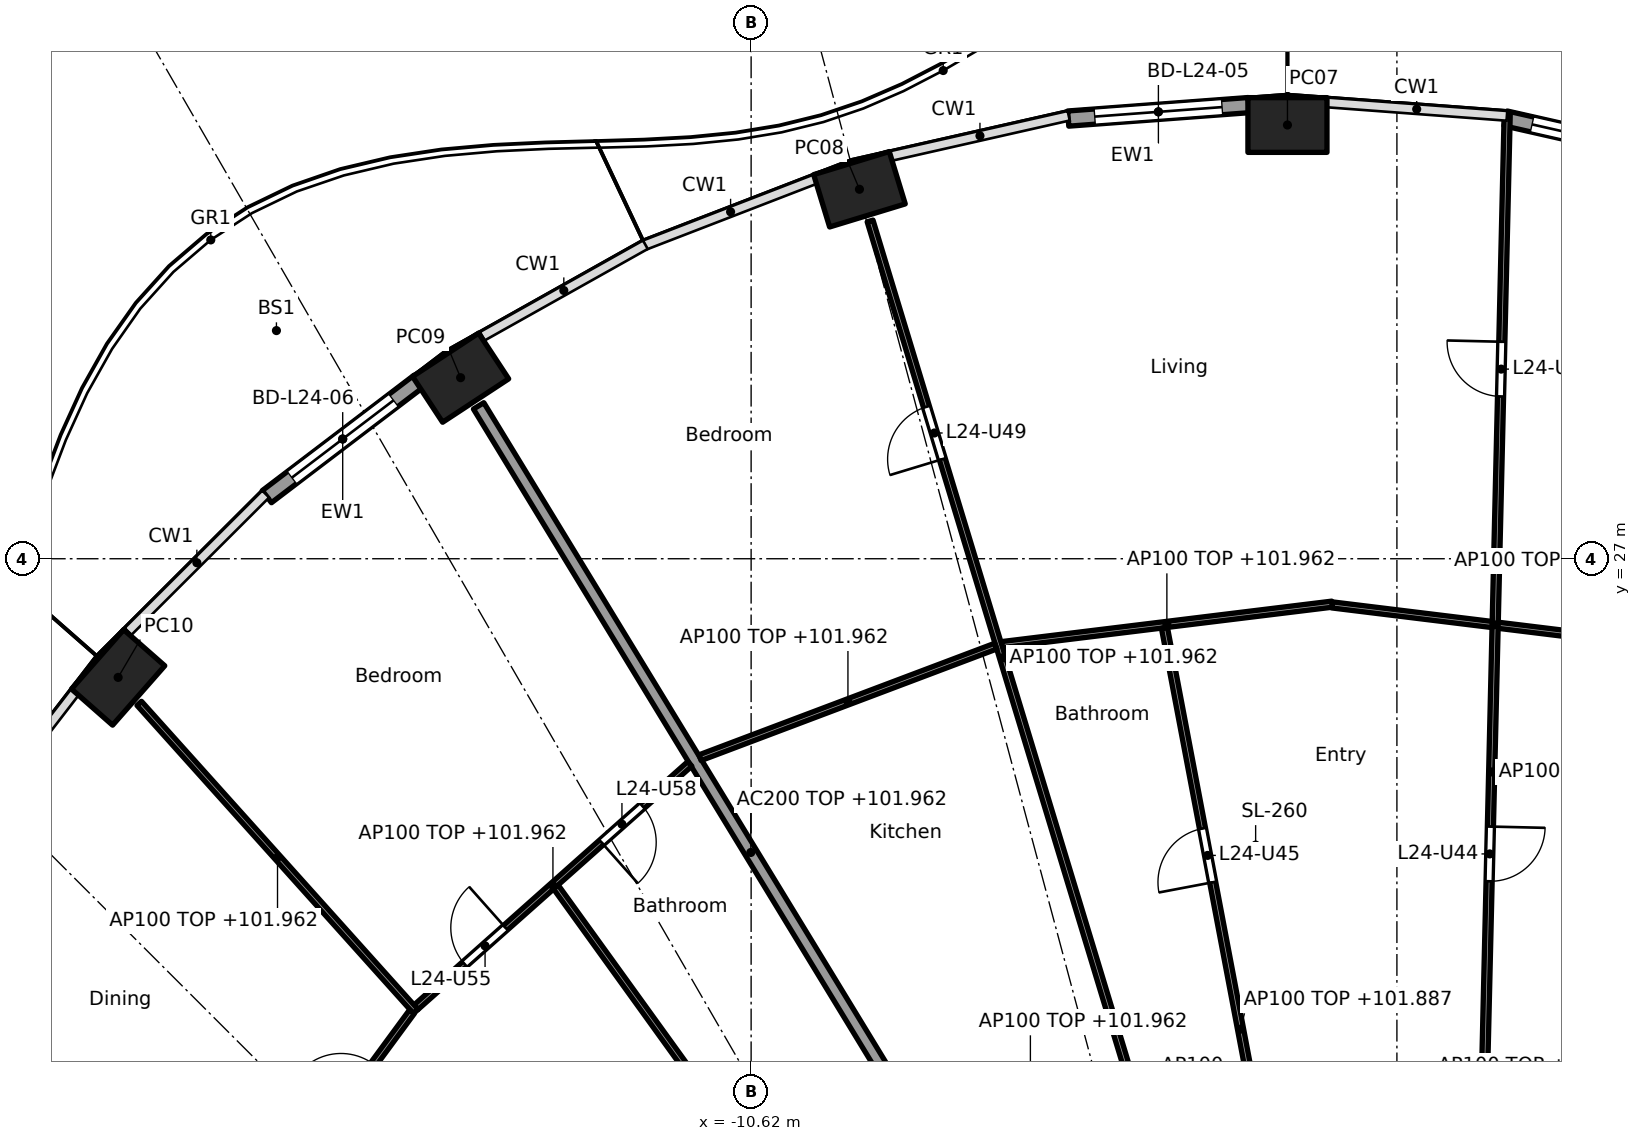
"""IFC4 building model, lengths in metres.
Left out: names, types, materials, properties, quantities, classifications, styles, units other than length and angle.
Written with IfcOpenShell. Run it as: python <this file> out.ifc"""

import sys

from ifc_helpers import new_model, si_unit, direction, frame, frame_2d, origin, origin_2d, place, context, subcontext, project, spatial, rectangle, hollow_rectangle, extrude, element, fill, save


model = new_model("IFC4")
c1 = context("Model", 3, precision=1e-05, world=origin(), true_north=direction((0.0, 1.0)))
c2 = subcontext(c1, "Body", "Model", "MODEL_VIEW")
j1 = project(units=[si_unit("LENGTHUNIT", "METRE"), si_unit("PLANEANGLEUNIT", "RADIAN")], contexts=[c1])
p1 = place(None, origin())
s1 = spatial("IfcSite", under=j1, at=p1, CompositionType="ELEMENT")
p2 = place(p1, origin())
s2 = spatial("IfcBuilding", under=s1, at=p2, CompositionType="ELEMENT")
p3 = place(p2, frame((0.0, 0.0, 99.2)))
s3 = spatial("IfcBuildingStorey", under=s2, at=p3, CompositionType="ELEMENT", Elevation=99.2)
for number, where, z_axis, x_axis in (
    (1, (-1.8, 34.133, 0.0), (0.0, 0.0, 1.0), (-1.0, 0.0, 0.0)),
    (2, (-8.839, 33.076, 0.0), (0.0, 0.0, 1.0), (-0.957, -0.292, 0.0)),
    (3, (-15.397, 29.978, 0.0), (0.0, 0.0, 1.0), (-0.836, -0.549, 0.0)),
    (4, (-21.03, 25.049, 0.0), (0.0, 0.0, 1.0), (-0.66, -0.751, 0.0)),
):
    element("IfcColumn", number, at=place(p3, frame(where, z_axis=z_axis, x_axis=x_axis)), inside=s3, PredefinedType="COLUMN", context=c2, shape_type="SweptSolid", body=[
        extrude(hollow_rectangle(XDim=1.3, YDim=0.9, WallThickness=0.045, at=origin_2d()), origin(), (0.0, 0.0, 1.0), 3.7),
    ])
p4 = place(p3, frame((1.787, 34.241, 0.0), z_axis=(0.0, 0.0, 1.0), x_axis=(0.975317607872, -0.220806620767, 0.0)))
e5 = element("IfcWall", 5, at=p4, inside=s3, PredefinedType="SOLIDWALL", context=c2, shape_type="SweptSolid", body=[
    extrude(rectangle(XDim=2.993, YDim=0.25, at=frame_2d((1.497, 0.0))), origin(), (0.0, 0.0, 1.0), 3.44),
])
p5 = place(p4, frame((0.447, 0.0, 0.0)))
e6 = element("IfcOpeningElement", 6, at=p5, cuts=e5, PredefinedType="OPENING", context=c2, shape_type="SweptSolid", body=[
    extrude(rectangle(XDim=2.1, YDim=2.4, at=frame_2d((1.05, 1.2))), frame((0.0, 0.135, 0.0), z_axis=(0.0, -1.0, 0.0), x_axis=(1.0, 0.0, 0.0)), (0.0, 0.0, 1.0), 0.27),
])
p6 = place(p3, frame((-5.406, 34.239, 0.0), z_axis=(0.0, 0.0, 1.0), x_axis=(0.997231808538, 0.074355363224, 0.0)))
e7 = element("IfcWall", 7, at=p6, inside=s3, PredefinedType="SOLIDWALL", context=c2, shape_type="SweptSolid", body=[
    extrude(rectangle(XDim=2.975, YDim=0.25, at=frame_2d((1.487, 0.0))), origin(), (0.0, 0.0, 1.0), 3.44),
])
p7 = place(p6, frame((0.438, 0.0, 0.0)))
e8 = element("IfcOpeningElement", 8, at=p7, cuts=e7, PredefinedType="OPENING", context=c2, shape_type="SweptSolid", body=[
    extrude(rectangle(XDim=2.1, YDim=2.4, at=frame_2d((1.05, 1.2))), frame((0.0, 0.135, 0.0), z_axis=(0.0, -1.0, 0.0), x_axis=(1.0, 0.0, 0.0)), (0.0, 0.0, 1.0), 0.27),
])
p8 = place(p3, frame((-18.584, 28.021, 0.0), z_axis=(0.0, 0.0, 1.0), x_axis=(0.796037575978, 0.605247203736, 0.0)))
e9 = element("IfcWall", 9, at=p8, inside=s3, PredefinedType="SOLIDWALL", context=c2, shape_type="SweptSolid", body=[
    extrude(rectangle(XDim=3.134, YDim=0.25, at=frame_2d((1.567, 0.0))), origin(), (0.0, 0.0, 1.0), 3.44),
])
p9 = place(p8, frame((0.517, 0.0, 0.0)))
e10 = element("IfcOpeningElement", 10, at=p9, cuts=e9, PredefinedType="OPENING", context=c2, shape_type="SweptSolid", body=[
    extrude(rectangle(XDim=2.1, YDim=2.4, at=frame_2d((1.05, 1.2))), frame((0.0, 0.135, 0.0), z_axis=(0.0, -1.0, 0.0), x_axis=(1.0, 0.0, 0.0)), (0.0, 0.0, 1.0), 0.27),
])
p10 = place(p3, frame((-6.149, 14.825, 0.0), z_axis=(0.0, 0.0, 1.0), x_axis=(-0.520412862249, 0.853914780763, 0.0)))
e11 = element("IfcWall", 11, at=p10, inside=s3, PredefinedType="PARTITIONING", context=c2, shape_type="SweptSolid", body=[
    extrude(rectangle(XDim=17.202, YDim=0.2, at=frame_2d((8.601, 0.0))), origin(), (0.0, 0.0, 1.0), 2.762),
])
p11 = place(p3, frame((4.267, 25.587, 0.0), z_axis=(0.0, 0.0, 1.0), x_axis=(-0.992576206119, 0.121624319302, 0.0)))
e12 = element("IfcWall", 12, at=p11, inside=s3, PredefinedType="PARTITIONING", context=c2, shape_type="SweptSolid", body=[
    extrude(rectangle(XDim=5.374, YDim=0.1, at=frame_2d((2.687, 0.0))), origin(), (0.0, 0.0, 1.0), 2.762),
])
p12 = place(p3, frame((1.303, 12.665, 0.0), z_axis=(0.0, 0.0, 1.0), x_axis=(0.023564110689, 0.999722327793, 0.0)))
e13 = element("IfcWall", 13, at=p12, inside=s3, PredefinedType="PARTITIONING", context=c2, shape_type="SweptSolid", body=[
    extrude(rectangle(XDim=21.664, YDim=0.1, at=frame_2d((10.832, 0.0))), origin(), (0.0, 0.0, 1.0), 2.687),
])
p13 = place(p12, frame((2.407, 0.0, 0.0)))
e14 = element("IfcOpeningElement", 14, at=p13, cuts=e13, PredefinedType="OPENING", context=c2, shape_type="SweptSolid", body=[
    extrude(rectangle(XDim=0.9, YDim=2.1, at=frame_2d((0.45, 1.05))), frame((0.0, 0.06, 0.0), z_axis=(0.0, -1.0, 0.0), x_axis=(1.0, 0.0, 0.0)), (0.0, 0.0, 1.0), 0.12),
])
p14 = place(p12, frame((9.034, 0.0, 0.0)))
e15 = element("IfcOpeningElement", 15, at=p14, cuts=e13, PredefinedType="OPENING", context=c2, shape_type="SweptSolid", body=[
    extrude(rectangle(XDim=0.9, YDim=2.1, at=frame_2d((0.45, 1.05))), frame((0.0, 0.06, 0.0), z_axis=(0.0, -1.0, 0.0), x_axis=(1.0, 0.0, 0.0)), (0.0, 0.0, 1.0), 0.12),
])
p15 = place(p12, frame((17.009, 0.0, 0.0)))
e16 = element("IfcOpeningElement", 16, at=p15, cuts=e13, PredefinedType="OPENING", context=c2, shape_type="SweptSolid", body=[
    extrude(rectangle(XDim=0.9, YDim=2.1, at=frame_2d((0.45, 1.05))), frame((0.0, 0.06, 0.0), z_axis=(0.0, -1.0, 0.0), x_axis=(1.0, 0.0, 0.0)), (0.0, 0.0, 1.0), 0.12),
])
p16 = place(p3, frame((-1.066, 26.253, 0.0), z_axis=(0.0, 0.0, 1.0), x_axis=(-0.992574853421, -0.121635358166, 0.0)))
e17 = element("IfcWall", 17, at=p16, inside=s3, PredefinedType="PARTITIONING", context=c2, shape_type="SweptSolid", body=[
    extrude(rectangle(XDim=5.473, YDim=0.1, at=frame_2d((2.737, 0.0))), origin(), (0.0, 0.0, 1.0), 2.762),
])
p17 = place(p3, frame((-1.32, 12.663, 0.0), z_axis=(0.0, 0.0, 1.0), x_axis=(-0.186308855238, 0.982491226658, 0.0)))
e18 = element("IfcWall", 18, at=p17, inside=s3, PredefinedType="PARTITIONING", context=c2, shape_type="SweptSolid", body=[
    extrude(rectangle(XDim=13.437, YDim=0.1, at=frame_2d((6.719, 0.0))), origin(), (0.0, 0.0, 1.0), 2.687),
])
p18 = place(p17, frame((2.458, 0.0, 0.0)))
e19 = element("IfcOpeningElement", 19, at=p18, cuts=e18, PredefinedType="OPENING", context=c2, shape_type="SweptSolid", body=[
    extrude(rectangle(XDim=0.9, YDim=2.1, at=frame_2d((0.45, 1.05))), frame((0.0, 0.06, 0.0), z_axis=(0.0, -1.0, 0.0), x_axis=(1.0, 0.0, 0.0)), (0.0, 0.0, 1.0), 0.12),
])
p19 = place(p17, frame((9.177, 0.0, 0.0)))
e20 = element("IfcOpeningElement", 20, at=p19, cuts=e18, PredefinedType="OPENING", context=c2, shape_type="SweptSolid", body=[
    extrude(rectangle(XDim=0.9, YDim=2.1, at=frame_2d((0.45, 1.05))), frame((0.0, 0.06, 0.0), z_axis=(0.0, -1.0, 0.0), x_axis=(1.0, 0.0, 0.0)), (0.0, 0.0, 1.0), 0.12),
])
p20 = place(p3, frame((-4.306, 18.185, 0.0), z_axis=(0.0, 0.0, 1.0), x_axis=(-0.290183838394, 0.956970919064, 0.0)))
e21 = element("IfcWall", 21, at=p20, inside=s3, PredefinedType="PARTITIONING", context=c2, shape_type="SweptSolid", body=[
    extrude(rectangle(XDim=15.015, YDim=0.1, at=frame_2d((7.508, 0.0))), origin(), (0.0, 0.0, 1.0), 2.762),
])
p21 = place(p20, frame((10.922, 0.0, 0.0)))
e22 = element("IfcOpeningElement", 22, at=p21, cuts=e21, PredefinedType="OPENING", context=c2, shape_type="SweptSolid", body=[
    extrude(rectangle(XDim=0.9, YDim=2.1, at=frame_2d((0.45, 1.05))), frame((0.0, 0.06, 0.0), z_axis=(0.0, -1.0, 0.0), x_axis=(1.0, 0.0, 0.0)), (0.0, 0.0, 1.0), 0.12),
])
p22 = place(p3, frame((-6.596, 25.563, 0.0), z_axis=(0.0, 0.0, 1.0), x_axis=(-0.935624838262, -0.352995980185, 0.0)))
e23 = element("IfcWall", 23, at=p22, inside=s3, PredefinedType="PARTITIONING", context=c2, shape_type="SweptSolid", body=[
    extrude(rectangle(XDim=5.199, YDim=0.1, at=frame_2d((2.6, 0.0))), origin(), (0.0, 0.0, 1.0), 2.762),
])
p23 = place(p3, frame((-11.628, 23.626, 0.0), z_axis=(0.0, 0.0, 1.0), x_axis=(-0.747429444005, -0.664341197153, 0.0)))
e24 = element("IfcWall", 24, at=p23, inside=s3, PredefinedType="PARTITIONING", context=c2, shape_type="SweptSolid", body=[
    extrude(rectangle(XDim=6.024, YDim=0.1, at=frame_2d((3.012, 0.0))), origin(), (0.0, 0.0, 1.0), 2.762),
])
p24 = place(p23, frame((4.055, 0.0, 0.0)))
e25 = element("IfcOpeningElement", 25, at=p24, cuts=e24, PredefinedType="OPENING", context=c2, shape_type="SweptSolid", body=[
    extrude(rectangle(XDim=0.9, YDim=2.1, at=frame_2d((0.45, 1.05))), frame((0.0, 0.06, 0.0), z_axis=(0.0, -1.0, 0.0), x_axis=(1.0, 0.0, 0.0)), (0.0, 0.0, 1.0), 0.12),
])
p25 = place(p23, frame((1.043, 0.0, 0.0)))
e26 = element("IfcOpeningElement", 26, at=p25, cuts=e24, PredefinedType="OPENING", context=c2, shape_type="SweptSolid", body=[
    extrude(rectangle(XDim=0.9, YDim=2.1, at=frame_2d((0.45, 1.05))), frame((0.0, 0.06, 0.0), z_axis=(0.0, -1.0, 0.0), x_axis=(1.0, 0.0, 0.0)), (0.0, 0.0, 1.0), 0.12),
])
p26 = place(p3, frame((-6.49, 11.419, 0.0), z_axis=(0.0, 0.0, 1.0), x_axis=(-0.584832823883, 0.811153849839, 0.0)))
e27 = element("IfcWall", 27, at=p26, inside=s3, PredefinedType="PARTITIONING", context=c2, shape_type="SweptSolid", body=[
    extrude(rectangle(XDim=12.553, YDim=0.1, at=frame_2d((6.277, 0.0))), origin(), (0.0, 0.0, 1.0), 2.687),
])
p27 = place(p26, frame((4.166, 0.0, 0.0)))
e28 = element("IfcOpeningElement", 28, at=p27, cuts=e27, PredefinedType="OPENING", context=c2, shape_type="SweptSolid", body=[
    extrude(rectangle(XDim=0.9, YDim=2.1, at=frame_2d((0.45, 1.05))), frame((0.0, 0.06, 0.0), z_axis=(0.0, -1.0, 0.0), x_axis=(1.0, 0.0, 0.0)), (0.0, 0.0, 1.0), 0.12),
])
p28 = place(p3, frame((-16.134, 19.554, 0.0), z_axis=(0.0, 0.0, 1.0), x_axis=(-0.667985610263, 0.74417418961, 0.0)))
e29 = element("IfcWall", 29, at=p28, inside=s3, PredefinedType="PARTITIONING", context=c2, shape_type="SweptSolid", body=[
    extrude(rectangle(XDim=6.809, YDim=0.1, at=frame_2d((3.405, 0.0))), origin(), (0.0, 0.0, 1.0), 2.762),
])
p29 = place(p3, frame((-16.197, 19.551, 0.0), z_axis=(0.0, 0.0, 1.0), x_axis=(-0.592391983588, -0.80564988536, 0.0)))
e30 = element("IfcWall", 30, at=p29, inside=s3, PredefinedType="PARTITIONING", context=c2, shape_type="SweptSolid", body=[
    extrude(rectangle(XDim=6.08, YDim=0.1, at=frame_2d((3.04, 0.0))), origin(), (0.0, 0.0, 1.0), 2.762),
])
p30 = place(p29, frame((1.07, 0.0, 0.0)))
e31 = element("IfcOpeningElement", 31, at=p30, cuts=e30, PredefinedType="OPENING", context=c2, shape_type="SweptSolid", body=[
    extrude(rectangle(XDim=0.9, YDim=2.1, at=frame_2d((0.45, 1.05))), frame((0.0, 0.06, 0.0), z_axis=(0.0, -1.0, 0.0), x_axis=(1.0, 0.0, 0.0)), (0.0, 0.0, 1.0), 0.12),
])
p31 = place(p5, origin())
e32 = element("IfcDoor", 32, at=p31, inside=s3, OperationType="SLIDING_TO_LEFT", PredefinedType="DOOR", context=c2, shape_type="SweptSolid", body=[
    extrude(rectangle(XDim=2.1, YDim=2.4, at=frame_2d((1.05, 1.2))), frame((0.0, 0.025, 0.0), z_axis=(0.0, -1.0, 0.0), x_axis=(1.0, 0.0, 0.0)), (0.0, 0.0, 1.0), 0.05),
])
fill(e6, e32)
p32 = place(p7, origin())
e33 = element("IfcDoor", 33, at=p32, inside=s3, OperationType="SLIDING_TO_LEFT", PredefinedType="DOOR", context=c2, shape_type="SweptSolid", body=[
    extrude(rectangle(XDim=2.1, YDim=2.4, at=frame_2d((1.05, 1.2))), frame((0.0, 0.025, 0.0), z_axis=(0.0, -1.0, 0.0), x_axis=(1.0, 0.0, 0.0)), (0.0, 0.0, 1.0), 0.05),
])
fill(e8, e33)
p33 = place(p9, origin())
e34 = element("IfcDoor", 34, at=p33, inside=s3, OperationType="SLIDING_TO_LEFT", PredefinedType="DOOR", context=c2, shape_type="SweptSolid", body=[
    extrude(rectangle(XDim=2.1, YDim=2.4, at=frame_2d((1.05, 1.2))), frame((0.0, 0.025, 0.0), z_axis=(0.0, -1.0, 0.0), x_axis=(1.0, 0.0, 0.0)), (0.0, 0.0, 1.0), 0.05),
])
fill(e10, e34)
p34 = place(p14, frame((0.9, 0.0, 0.0), x_axis=(-1.0, 0.0, 0.0)))
e35 = element("IfcDoor", 35, at=p34, inside=s3, OperationType="SINGLE_SWING_LEFT", PredefinedType="DOOR", context=c2, shape_type="SweptSolid", body=[
    extrude(rectangle(XDim=0.9, YDim=2.1, at=frame_2d((0.45, 1.05))), frame((0.0, 0.025, 0.0), z_axis=(0.0, -1.0, 0.0), x_axis=(1.0, 0.0, 0.0)), (0.0, 0.0, 1.0), 0.05),
])
fill(e15, e35)
p35 = place(p19, origin())
e36 = element("IfcDoor", 36, at=p35, inside=s3, OperationType="SINGLE_SWING_LEFT", PredefinedType="DOOR", context=c2, shape_type="SweptSolid", body=[
    extrude(rectangle(XDim=0.9, YDim=2.1, at=frame_2d((0.45, 1.05))), frame((0.0, 0.025, 0.0), z_axis=(0.0, -1.0, 0.0), x_axis=(1.0, 0.0, 0.0)), (0.0, 0.0, 1.0), 0.05),
])
fill(e20, e36)
p36 = place(p15, origin())
e37 = element("IfcDoor", 37, at=p36, inside=s3, OperationType="SINGLE_SWING_RIGHT", PredefinedType="DOOR", context=c2, shape_type="SweptSolid", body=[
    extrude(rectangle(XDim=0.9, YDim=2.1, at=frame_2d((0.45, 1.05))), frame((0.0, 0.025, 0.0), z_axis=(0.0, -1.0, 0.0), x_axis=(1.0, 0.0, 0.0)), (0.0, 0.0, 1.0), 0.05),
])
fill(e16, e37)
p37 = place(p21, origin())
e38 = element("IfcDoor", 38, at=p37, inside=s3, OperationType="SINGLE_SWING_LEFT", PredefinedType="DOOR", context=c2, shape_type="SweptSolid", body=[
    extrude(rectangle(XDim=0.9, YDim=2.1, at=frame_2d((0.45, 1.05))), frame((0.0, 0.025, 0.0), z_axis=(0.0, -1.0, 0.0), x_axis=(1.0, 0.0, 0.0)), (0.0, 0.0, 1.0), 0.05),
])
fill(e22, e38)
p38 = place(p24, frame((0.9, 0.0, 0.0), x_axis=(-1.0, 0.0, 0.0)))
e39 = element("IfcDoor", 39, at=p38, inside=s3, OperationType="SINGLE_SWING_RIGHT", PredefinedType="DOOR", context=c2, shape_type="SweptSolid", body=[
    extrude(rectangle(XDim=0.9, YDim=2.1, at=frame_2d((0.45, 1.05))), frame((0.0, 0.025, 0.0), z_axis=(0.0, -1.0, 0.0), x_axis=(1.0, 0.0, 0.0)), (0.0, 0.0, 1.0), 0.05),
])
fill(e25, e39)
p39 = place(p25, origin())
e40 = element("IfcDoor", 40, at=p39, inside=s3, OperationType="SINGLE_SWING_RIGHT", PredefinedType="DOOR", context=c2, shape_type="SweptSolid", body=[
    extrude(rectangle(XDim=0.9, YDim=2.1, at=frame_2d((0.45, 1.05))), frame((0.0, 0.025, 0.0), z_axis=(0.0, -1.0, 0.0), x_axis=(1.0, 0.0, 0.0)), (0.0, 0.0, 1.0), 0.05),
])
fill(e26, e40)
save(model, sys.argv[1])
